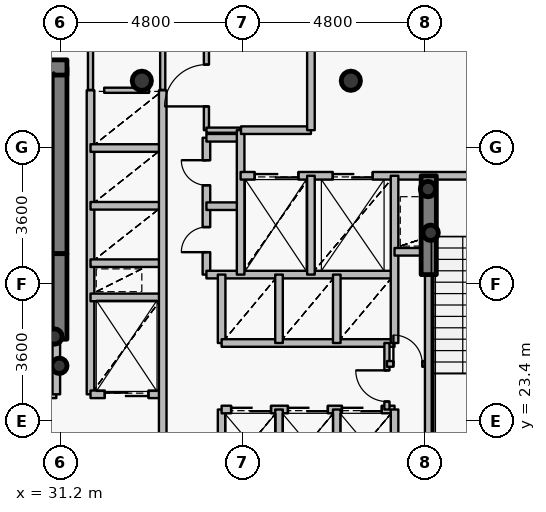
"""IFC4 building model, lengths in metres.
Left out: names, types, materials, properties, quantities, classifications, styles, units other than length and angle.
Written with IfcOpenShell. Run it as: python <this file> out.ifc"""

import sys

from ifc_helpers import new_model, si_unit, direction, frame, frame_2d, origin, origin_2d, place, context, subcontext, project, spatial, rectangle, hollow_circle, extrude, source, transform, mapped, element, fill, save


model = new_model("IFC4")
c1 = context("Model", 3, precision=1e-05, world=origin(), true_north=direction((0.0, 1.0)))
c2 = subcontext(c1, "Body", "Model", "MODEL_VIEW")
j1 = project(units=[si_unit("LENGTHUNIT", "METRE"), si_unit("PLANEANGLEUNIT", "RADIAN")], contexts=[c1])
p1 = place(None, origin())
s1 = spatial("IfcSite", under=j1, at=p1, CompositionType="ELEMENT")
p2 = place(p1, origin())
s2 = spatial("IfcBuilding", under=s1, at=p2, CompositionType="ELEMENT")
p3 = place(p2, frame((0.0, 0.0, 119.7)))
s3 = spatial("IfcBuildingStorey", under=s2, at=p3, CompositionType="ELEMENT", Elevation=119.7)
for number, where, z_axis, x_axis in (
    (1, (38.85, 32.35, 0.0), (0.0, 0.0, 1.0), (1.0, 0.0, 0.0)),
    (2, (33.35, 32.35, 0.0), (0.0, 0.0, 1.0), (1.0, 0.0, 0.0)),
):
    element("IfcColumn", number, at=place(p3, frame(where, z_axis=z_axis, x_axis=x_axis)), inside=s3, PredefinedType="COLUMN", context=c2, shape_type="SweptSolid", body=[
        extrude(hollow_circle(Radius=0.254, WallThickness=0.02, at=origin_2d()), origin(), (0.0, 0.0, 1.0), 3.75),
    ])
p4 = place(p3, frame((31.18, 27.8, 0.0), z_axis=(0.0, 0.0, 1.0), x_axis=(0.0, 1.0, 0.0)))
e3 = element("IfcWall", 3, at=p4, inside=s3, PredefinedType="SHEAR", context=c2, shape_type="SweptSolid", body=[
    extrude(rectangle(XDim=4.9, YDim=0.4, at=frame_2d((2.45, 0.0))), origin(), (0.0, 0.0, 1.0), 3.75),
])
p5 = place(p3, frame((27.28, 32.7, 0.0), z_axis=(0.0, 0.0, 1.0), x_axis=(1.0, 0.0, 0.0)))
e4 = element("IfcWall", 4, at=p5, inside=s3, PredefinedType="SHEAR", context=c2, shape_type="SweptSolid", body=[
    extrude(rectangle(XDim=4.1, YDim=0.4, at=frame_2d((2.05, 0.0))), origin(), (0.0, 0.0, 1.0), 3.75),
])
for number, where, z_axis, x_axis in (
    (5, (31.05, 25.62, 0.0), (0.0, 0.0, 1.0), (1.0, 0.0, 0.0)),
    (6, (31.18, 24.85, 0.0), (0.0, 0.0, 1.0), (1.0, 0.0, 0.0)),
    (7, (40.95, 28.35, 0.0), (0.0, 0.0, 1.0), (1.0, 0.0, 0.0)),
    (8, (40.88, 29.5, 0.0), (0.0, 0.0, 1.0), (1.0, 0.0, 0.0)),
):
    element("IfcColumn", number, at=place(p3, frame(where, z_axis=z_axis, x_axis=x_axis)), inside=s3, PredefinedType="COLUMN", context=c2, shape_type="SweptSolid", body=[
        extrude(hollow_circle(Radius=0.203, WallThickness=0.016, at=origin_2d()), origin(), (0.0, 0.0, 1.0), 3.75),
    ])
p6 = place(p3, frame((31.18, 25.55, 0.0), z_axis=(0.0, 0.0, 1.0), x_axis=(0.0, 1.0, 0.0)))
e9 = element("IfcWall", 9, at=p6, inside=s3, PredefinedType="SHEAR", context=c2, shape_type="SweptSolid", body=[
    extrude(rectangle(XDim=2.25, YDim=0.4, at=frame_2d((1.125, 0.0))), origin(), (0.0, 0.0, 1.0), 3.1),
])
p7 = place(p3, frame((40.9, 27.25, 0.0), z_axis=(0.0, 0.0, 1.0), x_axis=(0.0, 1.0, 0.0)))
e10 = element("IfcWall", 10, at=p7, inside=s3, PredefinedType="SHEAR", context=c2, shape_type="SweptSolid", body=[
    extrude(rectangle(XDim=2.6, YDim=0.4, at=frame_2d((1.3, 0.0))), origin(), (0.0, 0.0, 1.0), 3.1),
])
p8 = place(p3, frame((27.56, 24.1, 0.0), z_axis=(0.0, 0.0, 1.0), x_axis=(1.0, 0.0, 0.0)))
e11 = element("IfcWall", 11, at=p8, inside=s3, PredefinedType="PARTITIONING", context=c2, shape_type="SweptSolid", body=[
    extrude(rectangle(XDim=3.54, YDim=0.2, at=frame_2d((1.77, 0.0))), origin(), (0.0, 0.0, 1.0), 3.5),
])
p9 = place(p8, frame((1.17, 0.0, 0.0)))
e12 = element("IfcOpeningElement", 12, at=p9, cuts=e11, PredefinedType="OPENING", context=c2, shape_type="SweptSolid", body=[
    extrude(rectangle(XDim=1.2, YDim=2.15, at=origin_2d()), frame((0.6, 0.11, 1.075), z_axis=(0.0, -1.0, 0.0), x_axis=(1.0, 0.0, 0.0)), (0.0, 0.0, 1.0), 0.22),
])
p10 = place(p3, frame((31.1, 24.1, 0.0), z_axis=(0.0, 0.0, 1.0), x_axis=(0.0, 1.0, 0.0)))
e13 = element("IfcWall", 13, at=p10, inside=s3, PredefinedType="PARTITIONING", context=c2, shape_type="SweptSolid", body=[
    extrude(rectangle(XDim=1.44, YDim=0.2, at=frame_2d((0.72, 0.0))), origin(), (0.0, 0.0, 1.0), 3.5),
])
p11 = place(p3, frame((32.0, 24.1, 0.0), z_axis=(0.0, 0.0, 1.0), x_axis=(0.0, 1.0, 0.0)))
e14 = element("IfcWall", 14, at=p11, inside=s3, PredefinedType="PARTITIONING", context=c2, shape_type="SweptSolid", body=[
    extrude(rectangle(XDim=8.0, YDim=0.2, at=frame_2d((4.0, 0.0))), origin(), (0.0, 0.0, 1.0), 3.5),
])
p12 = place(p3, frame((32.0, 24.1, 0.0), z_axis=(0.0, 0.0, 1.0), x_axis=(1.0, 0.0, 0.0)))
e15 = element("IfcWall", 15, at=p12, inside=s3, PredefinedType="PARTITIONING", context=c2, shape_type="SweptSolid", body=[
    extrude(rectangle(XDim=1.9, YDim=0.2, at=frame_2d((0.95, 0.0))), origin(), (0.0, 0.0, 1.0), 3.085),
])
p13 = place(p12, frame((0.375, 0.0, 0.0)))
e16 = element("IfcOpeningElement", 16, at=p13, cuts=e15, PredefinedType="OPENING", context=c2, shape_type="SweptSolid", body=[
    extrude(rectangle(XDim=1.15, YDim=2.15, at=origin_2d()), frame((0.575, 0.11, 1.075), z_axis=(0.0, -1.0, 0.0), x_axis=(1.0, 0.0, 0.0)), (0.0, 0.0, 1.0), 0.22),
])
for number, where, z_axis, x_axis in (
    (17, (32.0, 26.65, 0.0), (0.0, 0.0, 1.0), (1.0, 0.0, 0.0)),
    (18, (32.0, 27.55, 0.0), (0.0, 0.0, 1.0), (1.0, 0.0, 0.0)),
    (19, (32.0, 29.06, 0.0), (0.0, 0.0, 1.0), (1.0, 0.0, 0.0)),
    (20, (32.0, 30.58, 0.0), (0.0, 0.0, 1.0), (1.0, 0.0, 0.0)),
):
    element("IfcWall", number, at=place(p3, frame(where, z_axis=z_axis, x_axis=x_axis)), inside=s3, PredefinedType="PARTITIONING", context=c2, shape_type="SweptSolid", body=[
        extrude(rectangle(XDim=1.9, YDim=0.2, at=frame_2d((0.95, 0.0))), origin(), (0.0, 0.0, 1.0), 3.085),
    ])
p14 = place(p3, frame((33.9, 20.6, 0.0), z_axis=(0.0, 0.0, 1.0), x_axis=(0.0, 1.0, 0.0)))
e21 = element("IfcWall", 21, at=p14, inside=s3, PredefinedType="PARTITIONING", context=c2, shape_type="SweptSolid", body=[
    extrude(rectangle(XDim=11.5, YDim=0.2, at=frame_2d((5.75, 0.0))), origin(), (0.0, 0.0, 1.0), 3.085),
])
p15 = place(p3, frame((35.05, 27.25, 0.0), z_axis=(0.0, 0.0, 1.0), x_axis=(0.0, 1.0, 0.0)))
e22 = element("IfcWall", 22, at=p15, inside=s3, PredefinedType="PARTITIONING", context=c2, shape_type="SweptSolid", body=[
    extrude(rectangle(XDim=3.6, YDim=0.2, at=frame_2d((1.8, 0.0))), origin(), (0.0, 0.0, 1.0), 3.5),
])
p16 = place(p15, frame((0.59, 0.0, 0.0)))
e23 = element("IfcOpeningElement", 23, at=p16, cuts=e22, PredefinedType="OPENING", context=c2, shape_type="SweptSolid", body=[
    extrude(rectangle(XDim=0.66, YDim=2.05, at=origin_2d()), frame((0.33, 0.11, 1.025), z_axis=(0.0, -1.0, 0.0), x_axis=(1.0, 0.0, 0.0)), (0.0, 0.0, 1.0), 0.22),
])
p17 = place(p15, frame((2.35, 0.0, 0.0)))
e24 = element("IfcOpeningElement", 24, at=p17, cuts=e22, PredefinedType="OPENING", context=c2, shape_type="SweptSolid", body=[
    extrude(rectangle(XDim=0.66, YDim=2.05, at=origin_2d()), frame((0.33, 0.11, 1.025), z_axis=(0.0, -1.0, 0.0), x_axis=(1.0, 0.0, 0.0)), (0.0, 0.0, 1.0), 0.22),
])
p18 = place(p3, frame((35.05, 27.25, 0.0), z_axis=(0.0, 0.0, 1.0), x_axis=(1.0, 0.0, 0.0)))
e25 = element("IfcWall", 25, at=p18, inside=s3, PredefinedType="PARTITIONING", context=c2, shape_type="SweptSolid", body=[
    extrude(rectangle(XDim=4.95, YDim=0.2, at=frame_2d((2.475, 0.0))), origin(), (0.0, 0.0, 1.0), 3.085),
])
for number, where, z_axis, x_axis in (
    (26, (35.05, 29.05, 0.0), (0.0, 0.0, 1.0), (1.0, 0.0, 0.0)),
    (27, (35.05, 30.85, 0.0), (0.0, 0.0, 1.0), (1.0, 0.0, 0.0)),
):
    element("IfcWall", number, at=place(p3, frame(where, z_axis=z_axis, x_axis=x_axis)), inside=s3, PredefinedType="PARTITIONING", context=c2, shape_type="SweptSolid", body=[
        extrude(rectangle(XDim=0.9, YDim=0.2, at=frame_2d((0.45, 0.0))), origin(), (0.0, 0.0, 1.0), 3.5),
    ])
p19 = place(p3, frame((35.05, 31.05, 0.0), z_axis=(0.0, 0.0, 1.0), x_axis=(0.0, 1.0, 0.0)))
e28 = element("IfcWall", 28, at=p19, inside=s3, PredefinedType="PARTITIONING", context=c2, shape_type="SweptSolid", body=[
    extrude(rectangle(XDim=2.35, YDim=0.135, at=frame_2d((1.175, 0.0))), origin(), (0.0, 0.0, 1.0), 3.085),
])
p20 = place(p19, frame((0.625, 0.0, 0.0)))
e29 = element("IfcOpeningElement", 29, at=p20, cuts=e28, PredefinedType="OPENING", context=c2, shape_type="SweptSolid", body=[
    extrude(rectangle(XDim=1.1, YDim=2.15, at=origin_2d()), frame((0.55, 0.078, 1.075), z_axis=(0.0, -1.0, 0.0), x_axis=(1.0, 0.0, 0.0)), (0.0, 0.0, 1.0), 0.155),
])
p21 = place(p3, frame((35.05, 31.05, 0.0), z_axis=(0.0, 0.0, 1.0), x_axis=(1.0, 0.0, 0.0)))
e30 = element("IfcWall", 30, at=p21, inside=s3, PredefinedType="PARTITIONING", context=c2, shape_type="SweptSolid", body=[
    extrude(rectangle(XDim=0.9, YDim=0.135, at=frame_2d((0.45, 0.0))), origin(), (0.0, 0.0, 1.0), 3.5),
])
p22 = place(p3, frame((35.45, 21.9, 0.0), z_axis=(0.0, 0.0, 1.0), x_axis=(0.0, 1.0, 0.0)))
e31 = element("IfcWall", 31, at=p22, inside=s3, PredefinedType="PARTITIONING", context=c2, shape_type="SweptSolid", body=[
    extrude(rectangle(XDim=1.8, YDim=0.2, at=frame_2d((0.9, 0.0))), origin(), (0.0, 0.0, 1.0), 3.5),
])
p23 = place(p3, frame((35.45, 23.7, 0.0), z_axis=(0.0, 0.0, 1.0), x_axis=(1.0, 0.0, 0.0)))
e32 = element("IfcWall", 32, at=p23, inside=s3, PredefinedType="PARTITIONING", context=c2, shape_type="SweptSolid", body=[
    extrude(rectangle(XDim=4.55, YDim=0.2, at=frame_2d((2.275, 0.0))), origin(), (0.0, 0.0, 1.0), 3.085),
])
p24 = place(p23, frame((0.25, 0.0, 0.0)))
e33 = element("IfcOpeningElement", 33, at=p24, cuts=e32, PredefinedType="OPENING", context=c2, shape_type="SweptSolid", body=[
    extrude(rectangle(XDim=1.05, YDim=2.15, at=origin_2d()), frame((0.525, 0.11, 1.075), z_axis=(0.0, -1.0, 0.0), x_axis=(1.0, 0.0, 0.0)), (0.0, 0.0, 1.0), 0.22),
])
p25 = place(p23, frame((1.745, 0.0, 0.0)))
e34 = element("IfcOpeningElement", 34, at=p25, cuts=e32, PredefinedType="OPENING", context=c2, shape_type="SweptSolid", body=[
    extrude(rectangle(XDim=1.05, YDim=2.15, at=origin_2d()), frame((0.525, 0.11, 1.075), z_axis=(0.0, -1.0, 0.0), x_axis=(1.0, 0.0, 0.0)), (0.0, 0.0, 1.0), 0.22),
])
p26 = place(p23, frame((3.165, 0.0, 0.0)))
e35 = element("IfcOpeningElement", 35, at=p26, cuts=e32, PredefinedType="OPENING", context=c2, shape_type="SweptSolid", body=[
    extrude(rectangle(XDim=1.05, YDim=2.15, at=origin_2d()), frame((0.525, 0.11, 1.075), z_axis=(0.0, -1.0, 0.0), x_axis=(1.0, 0.0, 0.0)), (0.0, 0.0, 1.0), 0.22),
])
p27 = place(p3, frame((35.45, 25.45, 0.0), z_axis=(0.0, 0.0, 1.0), x_axis=(0.0, 1.0, 0.0)))
e36 = element("IfcWall", 36, at=p27, inside=s3, PredefinedType="PARTITIONING", context=c2, shape_type="SweptSolid", body=[
    extrude(rectangle(XDim=1.8, YDim=0.2, at=frame_2d((0.9, 0.0))), origin(), (0.0, 0.0, 1.0), 3.5),
])
p28 = place(p3, frame((35.45, 25.45, 0.0), z_axis=(0.0, 0.0, 1.0), x_axis=(1.0, 0.0, 0.0)))
e37 = element("IfcWall", 37, at=p28, inside=s3, PredefinedType="PARTITIONING", context=c2, shape_type="SweptSolid", body=[
    extrude(rectangle(XDim=4.55, YDim=0.2, at=frame_2d((2.275, 0.0))), origin(), (0.0, 0.0, 1.0), 3.085),
])
p29 = place(p3, frame((35.95, 27.25, 0.0), z_axis=(0.0, 0.0, 1.0), x_axis=(0.0, 1.0, 0.0)))
e38 = element("IfcWall", 38, at=p29, inside=s3, PredefinedType="PARTITIONING", context=c2, shape_type="SweptSolid", body=[
    extrude(rectangle(XDim=3.8, YDim=0.2, at=frame_2d((1.9, 0.0))), origin(), (0.0, 0.0, 1.0), 3.5),
])
p30 = place(p3, frame((35.95, 29.85, 0.0), z_axis=(0.0, 0.0, 1.0), x_axis=(1.0, 0.0, 0.0)))
e39 = element("IfcWall", 39, at=p30, inside=s3, PredefinedType="PARTITIONING", context=c2, shape_type="SweptSolid", body=[
    extrude(rectangle(XDim=8.49, YDim=0.2, at=frame_2d((4.245, 0.0))), origin(), (0.0, 0.0, 1.0), 3.085),
])
p31 = place(p30, frame((6.1, 0.0, 0.0)))
e40 = element("IfcOpeningElement", 40, at=p31, cuts=e39, PredefinedType="OPENING", context=c2, shape_type="SweptSolid", body=[
    extrude(rectangle(XDim=1.2, YDim=2.15, at=origin_2d()), frame((0.6, 0.11, 1.075), z_axis=(0.0, -1.0, 0.0), x_axis=(1.0, 0.0, 0.0)), (0.0, 0.0, 1.0), 0.22),
])
p32 = place(p30, frame((0.37, 0.0, 0.0)))
e41 = element("IfcOpeningElement", 41, at=p32, cuts=e39, PredefinedType="OPENING", context=c2, shape_type="SweptSolid", body=[
    extrude(rectangle(XDim=1.15, YDim=2.15, at=origin_2d()), frame((0.575, 0.11, 1.075), z_axis=(0.0, -1.0, 0.0), x_axis=(1.0, 0.0, 0.0)), (0.0, 0.0, 1.0), 0.22),
])
p33 = place(p30, frame((2.425, 0.0, 0.0)))
e42 = element("IfcOpeningElement", 42, at=p33, cuts=e39, PredefinedType="OPENING", context=c2, shape_type="SweptSolid", body=[
    extrude(rectangle(XDim=1.05, YDim=2.15, at=origin_2d()), frame((0.525, 0.11, 1.075), z_axis=(0.0, -1.0, 0.0), x_axis=(1.0, 0.0, 0.0)), (0.0, 0.0, 1.0), 0.22),
])
p34 = place(p3, frame((35.96, 31.05, 0.0), z_axis=(0.0, 0.0, 1.0), x_axis=(1.0, 0.0, 0.0)))
e43 = element("IfcWall", 43, at=p34, inside=s3, PredefinedType="PARTITIONING", context=c2, shape_type="SweptSolid", body=[
    extrude(rectangle(XDim=1.84, YDim=0.2, at=frame_2d((0.92, 0.0))), origin(), (0.0, 0.0, 1.0), 3.5),
])
for number, where, z_axis, x_axis in (
    (44, (36.96, 21.9, 0.0), (0.0, 0.0, 1.0), (0.0, 1.0, 0.0)),
    (45, (36.96, 25.45, 0.0), (0.0, 0.0, 1.0), (0.0, 1.0, 0.0)),
):
    element("IfcWall", number, at=place(p3, frame(where, z_axis=z_axis, x_axis=x_axis)), inside=s3, PredefinedType="PARTITIONING", context=c2, shape_type="SweptSolid", body=[
        extrude(rectangle(XDim=1.8, YDim=0.2, at=frame_2d((0.9, 0.0))), origin(), (0.0, 0.0, 1.0), 3.5),
    ])
p35 = place(p3, frame((37.8, 27.25, 0.0), z_axis=(0.0, 0.0, 1.0), x_axis=(0.0, 1.0, 0.0)))
e46 = element("IfcWall", 46, at=p35, inside=s3, PredefinedType="PARTITIONING", context=c2, shape_type="SweptSolid", body=[
    extrude(rectangle(XDim=2.6, YDim=0.2, at=frame_2d((1.3, 0.0))), origin(), (0.0, 0.0, 1.0), 3.5),
])
p36 = place(p3, frame((37.8, 31.05, 0.0), z_axis=(0.0, 0.0, 1.0), x_axis=(0.0, 1.0, 0.0)))
e47 = element("IfcWall", 47, at=p36, inside=s3, PredefinedType="PARTITIONING", context=c2, shape_type="SweptSolid", body=[
    extrude(rectangle(XDim=2.35, YDim=0.2, at=frame_2d((1.175, 0.0))), origin(), (0.0, 0.0, 1.0), 3.085),
])
for number, where, z_axis, x_axis in (
    (48, (38.48, 21.9, 0.0), (0.0, 0.0, 1.0), (0.0, 1.0, 0.0)),
    (49, (38.48, 25.45, 0.0), (0.0, 0.0, 1.0), (0.0, 1.0, 0.0)),
):
    element("IfcWall", number, at=place(p3, frame(where, z_axis=z_axis, x_axis=x_axis)), inside=s3, PredefinedType="PARTITIONING", context=c2, shape_type="SweptSolid", body=[
        extrude(rectangle(XDim=1.8, YDim=0.2, at=frame_2d((0.9, 0.0))), origin(), (0.0, 0.0, 1.0), 3.5),
    ])
p37 = place(p3, frame((39.8, 23.7, 0.0), z_axis=(0.0, 0.0, 1.0), x_axis=(0.0, 1.0, 0.0)))
e50 = element("IfcWall", 50, at=p37, inside=s3, PredefinedType="PARTITIONING", context=c2, shape_type="SweptSolid", body=[
    extrude(rectangle(XDim=1.75, YDim=0.135, at=frame_2d((0.875, 0.0))), origin(), (0.0, 0.0, 1.0), 3.5),
])
p38 = place(p37, frame((0.21, 0.0, 0.0)))
e51 = element("IfcOpeningElement", 51, at=p38, cuts=e50, PredefinedType="OPENING", context=c2, shape_type="SweptSolid", body=[
    extrude(rectangle(XDim=0.82, YDim=2.1, at=origin_2d()), frame((0.41, 0.078, 1.05), z_axis=(0.0, -1.0, 0.0), x_axis=(1.0, 0.0, 0.0)), (0.0, 0.0, 1.0), 0.155),
])
p39 = place(p3, frame((39.8, 24.9, 0.0), z_axis=(0.0, 0.0, 1.0), x_axis=(1.0, 0.0, 0.0)))
e52 = element("IfcWall", 52, at=p39, inside=s3, PredefinedType="PARTITIONING", context=c2, shape_type="SweptSolid", body=[
    extrude(rectangle(XDim=1.1, YDim=0.15, at=frame_2d((0.55, 0.0))), origin(), (0.0, 0.0, 1.0), 3.5),
])
p40 = place(p39, frame((0.17, 0.0, 0.0)))
e53 = element("IfcOpeningElement", 53, at=p40, cuts=e52, PredefinedType="OPENING", context=c2, shape_type="SweptSolid", body=[
    extrude(rectangle(XDim=0.76, YDim=2.1, at=origin_2d()), frame((0.38, 0.085, 1.05), z_axis=(0.0, -1.0, 0.0), x_axis=(1.0, 0.0, 0.0)), (0.0, 0.0, 1.0), 0.17),
])
p41 = place(p3, frame((40.0, 21.9, 0.0), z_axis=(0.0, 0.0, 1.0), x_axis=(0.0, 1.0, 0.0)))
e54 = element("IfcWall", 54, at=p41, inside=s3, PredefinedType="PARTITIONING", context=c2, shape_type="SweptSolid", body=[
    extrude(rectangle(XDim=1.8, YDim=0.2, at=frame_2d((0.9, 0.0))), origin(), (0.0, 0.0, 1.0), 3.5),
])
p42 = place(p3, frame((40.0, 25.45, 0.0), z_axis=(0.0, 0.0, 1.0), x_axis=(0.0, 1.0, 0.0)))
e55 = element("IfcWall", 55, at=p42, inside=s3, PredefinedType="PARTITIONING", context=c2, shape_type="SweptSolid", body=[
    extrude(rectangle(XDim=4.4, YDim=0.2, at=frame_2d((2.2, 0.0))), origin(), (0.0, 0.0, 1.0), 3.5),
])
p43 = place(p3, frame((40.0, 27.85, 0.0), z_axis=(0.0, 0.0, 1.0), x_axis=(1.0, 0.0, 0.0)))
e56 = element("IfcWall", 56, at=p43, inside=s3, PredefinedType="PARTITIONING", context=c2, shape_type="SweptSolid", body=[
    extrude(rectangle(XDim=0.9, YDim=0.2, at=frame_2d((0.45, 0.0))), origin(), (0.0, 0.0, 1.0), 3.5),
])
p44 = place(p3, frame((40.9, 21.33, 0.0), z_axis=(0.0, 0.0, 1.0), x_axis=(0.0, 1.0, 0.0)))
e57 = element("IfcWall", 57, at=p44, inside=s3, PredefinedType="PARTITIONING", context=c2, shape_type="SweptSolid", body=[
    extrude(rectangle(XDim=5.91, YDim=0.2, at=frame_2d((2.955, 0.0))), origin(), (0.0, 0.0, 1.0), 3.035),
])
p45 = place(p3, frame((32.36, 32.1, 0.0), z_axis=(0.0, 0.0, 1.0), x_axis=(1.0, 0.0, 0.0)))
e58 = element("IfcWall", 58, at=p45, inside=s3, PredefinedType="PARTITIONING", context=c2, shape_type="SweptSolid", body=[
    extrude(rectangle(XDim=1.18, YDim=0.135, at=frame_2d((0.59, 0.0))), origin(), (0.0, 0.0, 1.0), 3.085),
])
p46 = place(p3, frame((32.0, 33.14, 0.0), z_axis=(0.0, 0.0, 1.0), x_axis=(0.0, -1.0, 0.0)))
e59 = element("IfcWall", 59, at=p46, inside=s3, PredefinedType="PARTITIONING", context=c2, shape_type="SweptSolid", body=[
    extrude(rectangle(XDim=1.03, YDim=0.135, at=frame_2d((0.515, 0.0))), origin(), (0.0, 0.0, 1.0), 3.035),
])
p47 = place(p3, frame((33.9, 32.11, 0.0), z_axis=(0.0, 0.0, 1.0), x_axis=(0.0, 1.0, 0.0)))
e60 = element("IfcWall", 60, at=p47, inside=s3, PredefinedType="PARTITIONING", context=c2, shape_type="SweptSolid", body=[
    extrude(rectangle(XDim=1.03, YDim=0.135, at=frame_2d((0.515, 0.0))), origin(), (0.0, 0.0, 1.0), 3.085),
])
m1 = source(origin(), c2, "Body", "SweptSolid", [
    extrude(rectangle(XDim=1.15, YDim=2.15, at=origin_2d()), frame((0.575, 0.025, 1.075), z_axis=(0.0, -1.0, 0.0), x_axis=(1.0, 0.0, 0.0)), (0.0, 0.0, 1.0), 0.05),
])
p48 = place(p32, origin())
e61 = element("IfcDoor", 61, at=p48, inside=s3, OperationType="DOUBLE_DOOR_SLIDING", PredefinedType="USERDEFINED", context=c2, shape_type="MappedRepresentation", body=[
    mapped(m1, transform((0.0, 0.0, 0.0), x_axis=(1.0, 0.0, 0.0), y_axis=(0.0, 1.0, 0.0), z_axis=(0.0, 0.0, 1.0), scale=1.0)),
])
fill(e41, e61)
p49 = place(p13, origin())
e62 = element("IfcDoor", 62, at=p49, inside=s3, OperationType="DOUBLE_DOOR_SLIDING", PredefinedType="USERDEFINED", context=c2, shape_type="MappedRepresentation", body=[
    mapped(m1, transform((0.0, 0.0, 0.0), x_axis=(1.0, 0.0, 0.0), y_axis=(0.0, 1.0, 0.0), z_axis=(0.0, 0.0, 1.0), scale=1.0)),
])
fill(e16, e62)
m2 = source(origin(), c2, "Body", "SweptSolid", [
    extrude(rectangle(XDim=1.05, YDim=2.15, at=origin_2d()), frame((0.525, 0.025, 1.075), z_axis=(0.0, -1.0, 0.0), x_axis=(1.0, 0.0, 0.0)), (0.0, 0.0, 1.0), 0.05),
])
p50 = place(p33, origin())
e63 = element("IfcDoor", 63, at=p50, inside=s3, OperationType="DOUBLE_DOOR_SLIDING", PredefinedType="USERDEFINED", context=c2, shape_type="MappedRepresentation", body=[
    mapped(m2, transform((0.0, 0.0, 0.0), x_axis=(1.0, 0.0, 0.0), y_axis=(0.0, 1.0, 0.0), z_axis=(0.0, 0.0, 1.0), scale=1.0)),
])
fill(e42, e63)
p51 = place(p24, origin())
e64 = element("IfcDoor", 64, at=p51, inside=s3, OperationType="DOUBLE_DOOR_SLIDING", PredefinedType="USERDEFINED", context=c2, shape_type="MappedRepresentation", body=[
    mapped(m2, transform((0.0, 0.0, 0.0), x_axis=(1.0, 0.0, 0.0), y_axis=(0.0, 1.0, 0.0), z_axis=(0.0, 0.0, 1.0), scale=1.0)),
])
fill(e33, e64)
p52 = place(p25, origin())
e65 = element("IfcDoor", 65, at=p52, inside=s3, OperationType="DOUBLE_DOOR_SLIDING", PredefinedType="USERDEFINED", context=c2, shape_type="MappedRepresentation", body=[
    mapped(m2, transform((0.0, 0.0, 0.0), x_axis=(1.0, 0.0, 0.0), y_axis=(0.0, 1.0, 0.0), z_axis=(0.0, 0.0, 1.0), scale=1.0)),
])
fill(e34, e65)
p53 = place(p26, origin())
e66 = element("IfcDoor", 66, at=p53, inside=s3, OperationType="DOUBLE_DOOR_SLIDING", PredefinedType="USERDEFINED", context=c2, shape_type="MappedRepresentation", body=[
    mapped(m2, transform((0.0, 0.0, 0.0), x_axis=(1.0, 0.0, 0.0), y_axis=(0.0, 1.0, 0.0), z_axis=(0.0, 0.0, 1.0), scale=1.0)),
])
fill(e35, e66)
m3 = source(origin(), c2, "Body", "SweptSolid", [
    extrude(rectangle(XDim=0.66, YDim=2.05, at=origin_2d()), frame((0.33, 0.025, 1.025), z_axis=(0.0, -1.0, 0.0), x_axis=(1.0, 0.0, 0.0)), (0.0, 0.0, 1.0), 0.05),
])
p54 = place(p16, origin())
e67 = element("IfcDoor", 67, at=p54, inside=s3, OperationType="SINGLE_SWING_LEFT", PredefinedType="USERDEFINED", context=c2, shape_type="MappedRepresentation", body=[
    mapped(m3, transform((0.0, 0.0, 0.0), x_axis=(1.0, 0.0, 0.0), y_axis=(0.0, 1.0, 0.0), z_axis=(0.0, 0.0, 1.0), scale=1.0)),
])
fill(e23, e67)
p55 = place(p17, origin())
e68 = element("IfcDoor", 68, at=p55, inside=s3, OperationType="SINGLE_SWING_RIGHT", PredefinedType="USERDEFINED", context=c2, shape_type="MappedRepresentation", body=[
    mapped(m3, transform((0.0, 0.0, 0.0), x_axis=(1.0, 0.0, 0.0), y_axis=(0.0, 1.0, 0.0), z_axis=(0.0, 0.0, 1.0), scale=1.0)),
])
fill(e24, e68)
m4 = source(origin(), c2, "Body", "SweptSolid", [
    extrude(rectangle(XDim=1.1, YDim=2.15, at=origin_2d()), frame((0.55, 0.025, 1.075), z_axis=(0.0, -1.0, 0.0), x_axis=(1.0, 0.0, 0.0)), (0.0, 0.0, 1.0), 0.05),
])
p56 = place(p20, origin())
e69 = element("IfcDoor", 69, at=p56, inside=s3, OperationType="SINGLE_SWING_LEFT", PredefinedType="DOOR", context=c2, shape_type="MappedRepresentation", body=[
    mapped(m4, transform((0.0, 0.0, 0.0), x_axis=(1.0, 0.0, 0.0), y_axis=(0.0, 1.0, 0.0), z_axis=(0.0, 0.0, 1.0), scale=1.0)),
])
fill(e29, e69)
m5 = source(origin(), c2, "Body", "SweptSolid", [
    extrude(rectangle(XDim=0.82, YDim=2.1, at=origin_2d()), frame((0.41, 0.025, 1.05), z_axis=(0.0, -1.0, 0.0), x_axis=(1.0, 0.0, 0.0)), (0.0, 0.0, 1.0), 0.05),
])
p57 = place(p38, origin())
e70 = element("IfcDoor", 70, at=p57, inside=s3, OperationType="SINGLE_SWING_RIGHT", PredefinedType="DOOR", context=c2, shape_type="MappedRepresentation", body=[
    mapped(m5, transform((0.0, 0.0, 0.0), x_axis=(1.0, 0.0, 0.0), y_axis=(0.0, 1.0, 0.0), z_axis=(0.0, 0.0, 1.0), scale=1.0)),
])
fill(e51, e70)
m6 = source(origin(), c2, "Body", "SweptSolid", [
    extrude(rectangle(XDim=0.76, YDim=2.1, at=origin_2d()), frame((0.38, 0.025, 1.05), z_axis=(0.0, -1.0, 0.0), x_axis=(1.0, 0.0, 0.0)), (0.0, 0.0, 1.0), 0.05),
])
p58 = place(p40, origin())
e71 = element("IfcDoor", 71, at=p58, inside=s3, OperationType="SINGLE_SWING_LEFT", PredefinedType="DOOR", context=c2, shape_type="MappedRepresentation", body=[
    mapped(m6, transform((0.0, 0.0, 0.0), x_axis=(1.0, 0.0, 0.0), y_axis=(0.0, 1.0, 0.0), z_axis=(0.0, 0.0, 1.0), scale=1.0)),
])
fill(e53, e71)
save(model, sys.argv[1])
